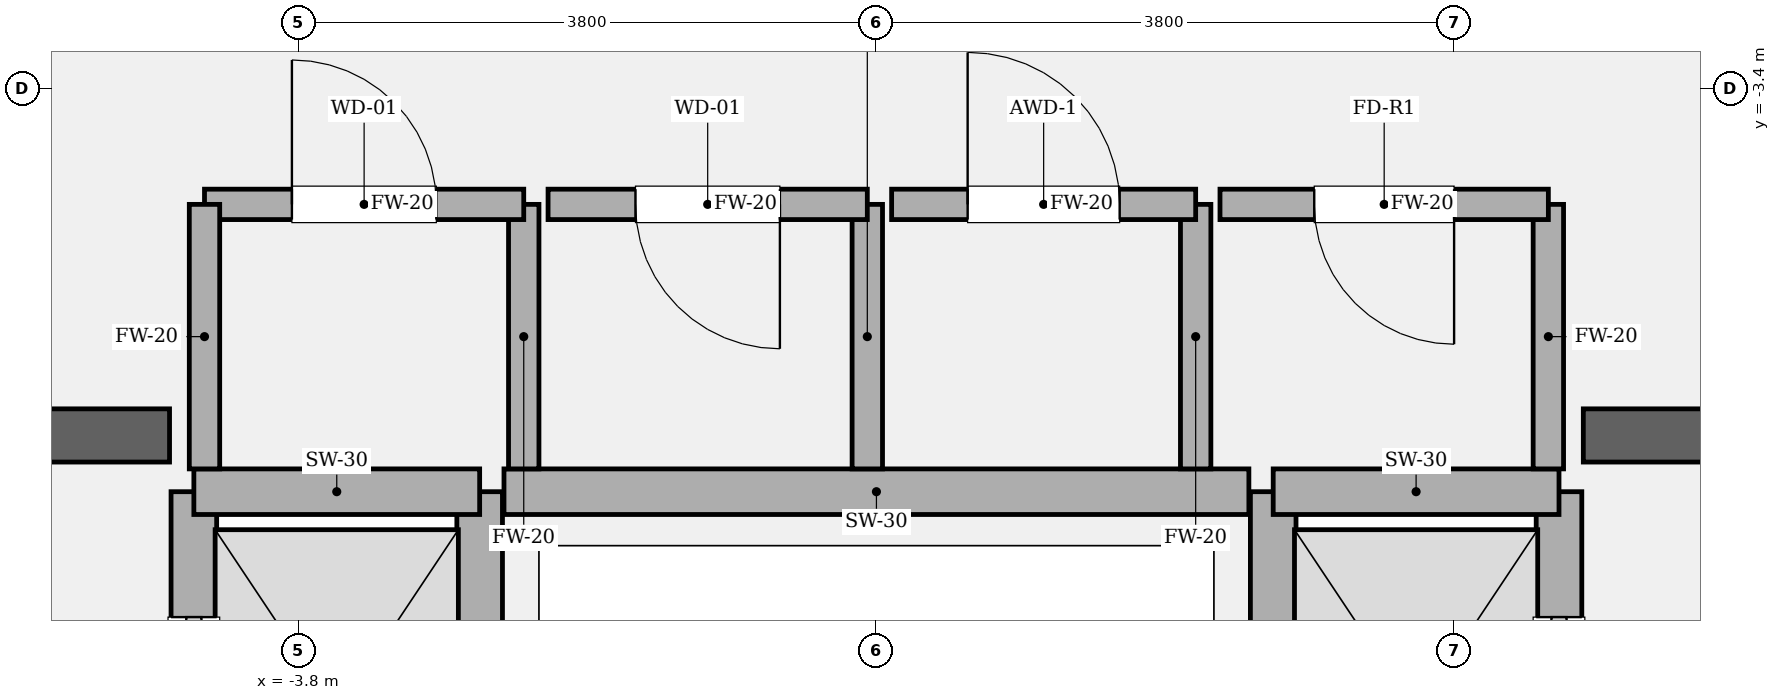
"""IFC4 building model, lengths in metres.
Left out: names, types, materials, properties, quantities, classifications, styles, units other than length and angle.
Written with IfcOpenShell. Run it as: python <this file> out.ifc"""

import sys

from ifc_helpers import new_model, si_unit, direction, frame, frame_2d, origin, place, context, subcontext, project, spatial, rectangle, extrude, element, fill, save


model = new_model("IFC4")
c1 = context("Model", 3, precision=1e-05, world=origin(), true_north=direction((0.0, 1.0)))
c2 = subcontext(c1, "Body", "Model", "MODEL_VIEW")
j1 = project(units=[si_unit("LENGTHUNIT", "METRE"), si_unit("PLANEANGLEUNIT", "RADIAN")], contexts=[c1])
p1 = place(None, origin())
s1 = spatial("IfcSite", under=j1, at=p1, CompositionType="ELEMENT")
p2 = place(p1, origin())
s2 = spatial("IfcBuilding", under=s1, at=p2, CompositionType="ELEMENT")
p3 = place(p2, frame((0.0, 0.0, 125.4)))
s3 = spatial("IfcBuildingStorey", under=s2, at=p3, CompositionType="ELEMENT", Elevation=125.4)
p4 = place(p3, frame((-9.875, -5.68, 0.0), z_axis=(0.0, 0.0, 1.0), x_axis=(1.0, 0.0, 0.0)))
e1 = element("IfcWall", 1, at=p4, inside=s3, PredefinedType="SOLIDWALL", context=c2, shape_type="SweptSolid", body=[
    extrude(rectangle(XDim=5.225, YDim=0.35, at=frame_2d((2.613, 0.0))), origin(), (0.0, 0.0, 1.0), 4.8),
])
p5 = place(p4, frame((1.335, 0.0, 0.0)))
e2 = element("IfcOpeningElement", 2, at=p5, cuts=e1, PredefinedType="OPENING", context=c2, shape_type="SweptSolid", body=[
    extrude(rectangle(XDim=1.18, YDim=2.2, at=frame_2d((0.59, 1.1))), frame((0.0, 0.185, 0.0), z_axis=(0.0, -1.0, 0.0), x_axis=(1.0, 0.0, 0.0)), (0.0, 0.0, 1.0), 0.37),
])
p6 = place(p3, frame((4.65, -5.68, 0.0), z_axis=(0.0, 0.0, 1.0), x_axis=(1.0, 0.0, 0.0)))
e3 = element("IfcWall", 3, at=p6, inside=s3, PredefinedType="SOLIDWALL", context=c2, shape_type="SweptSolid", body=[
    extrude(rectangle(XDim=5.225, YDim=0.35, at=frame_2d((2.613, 0.0))), origin(), (0.0, 0.0, 1.0), 4.8),
])
p7 = place(p6, frame((2.71, 0.0, 0.0)))
e4 = element("IfcOpeningElement", 4, at=p7, cuts=e3, PredefinedType="OPENING", context=c2, shape_type="SweptSolid", body=[
    extrude(rectangle(XDim=1.18, YDim=2.2, at=frame_2d((0.59, 1.1))), frame((0.0, 0.185, 0.0), z_axis=(0.0, -1.0, 0.0), x_axis=(1.0, 0.0, 0.0)), (0.0, 0.0, 1.0), 0.37),
])
p8 = place(p3, frame((-4.49, -8.82, 0.0), z_axis=(0.0, 0.0, 1.0), x_axis=(0.0, 1.0, 0.0)))
e5 = element("IfcWall", 5, at=p8, inside=s3, PredefinedType="SOLIDWALL", context=c2, shape_type="SweptSolid", body=[
    extrude(rectangle(XDim=2.77, YDim=0.3, at=frame_2d((1.385, 0.0))), origin(), (0.0, 0.0, 1.0), 4.48),
])
p9 = place(p8, frame((0.825, 0.0, 0.0)))
e6 = element("IfcOpeningElement", 6, at=p9, cuts=e5, PredefinedType="OPENING", context=c2, shape_type="SweptSolid", body=[
    extrude(rectangle(XDim=1.12, YDim=2.25, at=frame_2d((0.56, 1.125))), frame((0.0, 0.16, 0.0), z_axis=(0.0, -1.0, 0.0), x_axis=(1.0, 0.0, 0.0)), (0.0, 0.0, 1.0), 0.32),
])
p10 = place(p3, frame((-2.61, -8.82, 0.0), z_axis=(0.0, 0.0, 1.0), x_axis=(0.0, 1.0, 0.0)))
e7 = element("IfcWall", 7, at=p10, inside=s3, PredefinedType="SOLIDWALL", context=c2, shape_type="SweptSolid", body=[
    extrude(rectangle(XDim=2.77, YDim=0.3, at=frame_2d((1.385, 0.0))), origin(), (0.0, 0.0, 1.0), 4.48),
])
p11 = place(p3, frame((-4.49, -6.05, 0.0), z_axis=(0.0, 0.0, 1.0), x_axis=(1.0, 0.0, 0.0)))
e8 = element("IfcWall", 8, at=p11, inside=s3, PredefinedType="SOLIDWALL", context=c2, shape_type="SweptSolid", body=[
    extrude(rectangle(XDim=1.88, YDim=0.3, at=frame_2d((0.94, 0.0))), origin(), (0.0, 0.0, 1.0), 4.48),
])
p12 = place(p3, frame((4.49, -8.82, 0.0), z_axis=(0.0, 0.0, 1.0), x_axis=(0.0, 1.0, 0.0)))
e9 = element("IfcWall", 9, at=p12, inside=s3, PredefinedType="SOLIDWALL", context=c2, shape_type="SweptSolid", body=[
    extrude(rectangle(XDim=2.77, YDim=0.3, at=frame_2d((1.385, 0.0))), origin(), (0.0, 0.0, 1.0), 4.48),
])
p13 = place(p12, frame((0.825, 0.0, 0.0)))
e10 = element("IfcOpeningElement", 10, at=p13, cuts=e9, PredefinedType="OPENING", context=c2, shape_type="SweptSolid", body=[
    extrude(rectangle(XDim=1.12, YDim=2.25, at=frame_2d((0.56, 1.125))), frame((0.0, 0.16, 0.0), z_axis=(0.0, -1.0, 0.0), x_axis=(1.0, 0.0, 0.0)), (0.0, 0.0, 1.0), 0.32),
])
p14 = place(p3, frame((2.61, -8.82, 0.0), z_axis=(0.0, 0.0, 1.0), x_axis=(0.0, 1.0, 0.0)))
e11 = element("IfcWall", 11, at=p14, inside=s3, PredefinedType="SOLIDWALL", context=c2, shape_type="SweptSolid", body=[
    extrude(rectangle(XDim=2.77, YDim=0.3, at=frame_2d((1.385, 0.0))), origin(), (0.0, 0.0, 1.0), 4.48),
])
p15 = place(p3, frame((2.61, -6.05, 0.0), z_axis=(0.0, 0.0, 1.0), x_axis=(1.0, 0.0, 0.0)))
e12 = element("IfcWall", 12, at=p15, inside=s3, PredefinedType="SOLIDWALL", context=c2, shape_type="SweptSolid", body=[
    extrude(rectangle(XDim=1.88, YDim=0.3, at=frame_2d((0.94, 0.0))), origin(), (0.0, 0.0, 1.0), 4.48),
])
p16 = place(p3, frame((-2.45, -6.05, 0.0), z_axis=(0.0, 0.0, 1.0), x_axis=(1.0, 0.0, 0.0)))
e13 = element("IfcWall", 13, at=p16, inside=s3, PredefinedType="SOLIDWALL", context=c2, shape_type="SweptSolid", body=[
    extrude(rectangle(XDim=4.9, YDim=0.3, at=frame_2d((2.45, 0.0))), origin(), (0.0, 0.0, 1.0), 4.48),
])
p17 = place(p3, frame((-2.32, -5.9, 0.0), z_axis=(0.0, 0.0, 1.0), x_axis=(0.0, 1.0, 0.0)))
e14 = element("IfcWall", 14, at=p17, inside=s3, PredefinedType="SOLIDWALL", context=c2, shape_type="SweptSolid", body=[
    extrude(rectangle(XDim=1.74, YDim=0.2, at=frame_2d((0.87, 0.0))), origin(), (0.0, 0.0, 1.0), 4.48),
])
p18 = place(p3, frame((-2.32, -4.16, 0.0), z_axis=(0.0, 0.0, 1.0), x_axis=(-1.0, 0.0, 0.0)))
e15 = element("IfcWall", 15, at=p18, inside=s3, PredefinedType="SOLIDWALL", context=c2, shape_type="SweptSolid", body=[
    extrude(rectangle(XDim=2.1, YDim=0.2, at=frame_2d((1.05, 0.0))), origin(), (0.0, 0.0, 1.0), 4.48),
])
p19 = place(p18, frame((0.575, 0.0, 0.0)))
e16 = element("IfcOpeningElement", 16, at=p19, cuts=e15, PredefinedType="OPENING", context=c2, shape_type="SweptSolid", body=[
    extrude(rectangle(XDim=0.95, YDim=2.15, at=frame_2d((0.475, 1.075))), frame((0.0, 0.11, 0.0), z_axis=(0.0, -1.0, 0.0), x_axis=(1.0, 0.0, 0.0)), (0.0, 0.0, 1.0), 0.22),
])
for number, where, z_axis, x_axis in (
    (17, (-4.42, -4.16, 0.0), (0.0, 0.0, 1.0), (0.0, -1.0, 0.0)),
    (18, (-0.06, -5.9, 0.0), (0.0, 0.0, 1.0), (0.0, 1.0, 0.0)),
):
    element("IfcWall", number, at=place(p3, frame(where, z_axis=z_axis, x_axis=x_axis)), inside=s3, PredefinedType="SOLIDWALL", context=c2, shape_type="SweptSolid", body=[
        extrude(rectangle(XDim=1.74, YDim=0.2, at=frame_2d((0.87, 0.0))), origin(), (0.0, 0.0, 1.0), 4.48),
    ])
p20 = place(p3, frame((-0.06, -4.16, 0.0), z_axis=(0.0, 0.0, 1.0), x_axis=(-1.0, 0.0, 0.0)))
e19 = element("IfcWall", 19, at=p20, inside=s3, PredefinedType="SOLIDWALL", context=c2, shape_type="SweptSolid", body=[
    extrude(rectangle(XDim=2.1, YDim=0.2, at=frame_2d((1.05, 0.0))), origin(), (0.0, 0.0, 1.0), 4.48),
])
p21 = place(p20, frame((0.575, 0.0, 0.0)))
e20 = element("IfcOpeningElement", 20, at=p21, cuts=e19, PredefinedType="OPENING", context=c2, shape_type="SweptSolid", body=[
    extrude(rectangle(XDim=0.95, YDim=2.15, at=frame_2d((0.475, 1.075))), frame((0.0, 0.11, 0.0), z_axis=(0.0, -1.0, 0.0), x_axis=(1.0, 0.0, 0.0)), (0.0, 0.0, 1.0), 0.22),
])
p22 = place(p3, frame((2.1, -5.9, 0.0), z_axis=(0.0, 0.0, 1.0), x_axis=(0.0, 1.0, 0.0)))
e21 = element("IfcWall", 21, at=p22, inside=s3, PredefinedType="SOLIDWALL", context=c2, shape_type="SweptSolid", body=[
    extrude(rectangle(XDim=1.74, YDim=0.2, at=frame_2d((0.87, 0.0))), origin(), (0.0, 0.0, 1.0), 4.48),
])
p23 = place(p3, frame((2.1, -4.16, 0.0), z_axis=(0.0, 0.0, 1.0), x_axis=(-1.0, 0.0, 0.0)))
e22 = element("IfcWall", 22, at=p23, inside=s3, PredefinedType="SOLIDWALL", context=c2, shape_type="SweptSolid", body=[
    extrude(rectangle(XDim=2.0, YDim=0.2, at=frame_2d((1.0, 0.0))), origin(), (0.0, 0.0, 1.0), 4.48),
])
p24 = place(p23, frame((0.5, 0.0, 0.0)))
e23 = element("IfcOpeningElement", 23, at=p24, cuts=e22, PredefinedType="OPENING", context=c2, shape_type="SweptSolid", body=[
    extrude(rectangle(XDim=1.0, YDim=2.15, at=frame_2d((0.5, 1.075))), frame((0.0, 0.11, 0.0), z_axis=(0.0, -1.0, 0.0), x_axis=(1.0, 0.0, 0.0)), (0.0, 0.0, 1.0), 0.22),
])
p25 = place(p3, frame((4.42, -5.9, 0.0), z_axis=(0.0, 0.0, 1.0), x_axis=(0.0, 1.0, 0.0)))
e24 = element("IfcWall", 24, at=p25, inside=s3, PredefinedType="SOLIDWALL", context=c2, shape_type="SweptSolid", body=[
    extrude(rectangle(XDim=1.74, YDim=0.2, at=frame_2d((0.87, 0.0))), origin(), (0.0, 0.0, 1.0), 4.48),
])
p26 = place(p3, frame((4.42, -4.16, 0.0), z_axis=(0.0, 0.0, 1.0), x_axis=(-1.0, 0.0, 0.0)))
e25 = element("IfcWall", 25, at=p26, inside=s3, PredefinedType="SOLIDWALL", context=c2, shape_type="SweptSolid", body=[
    extrude(rectangle(XDim=2.16, YDim=0.2, at=frame_2d((1.08, 0.0))), origin(), (0.0, 0.0, 1.0), 4.48),
])
p27 = place(p26, frame((0.62, 0.0, 0.0)))
e26 = element("IfcOpeningElement", 26, at=p27, cuts=e25, PredefinedType="OPENING", context=c2, shape_type="SweptSolid", body=[
    extrude(rectangle(XDim=0.92, YDim=2.1, at=frame_2d((0.46, 1.05))), frame((0.0, 0.11, 0.0), z_axis=(0.0, -1.0, 0.0), x_axis=(1.0, 0.0, 0.0)), (0.0, 0.0, 1.0), 0.22),
])
p28 = place(p9, origin())
e27 = element("IfcDoor", 27, at=p28, inside=s3, OperationType="SLIDING_TO_LEFT", PredefinedType="DOOR", context=c2, shape_type="SweptSolid", body=[
    extrude(rectangle(XDim=1.12, YDim=2.25, at=frame_2d((0.56, 1.125))), frame((0.0, 0.025, 0.0), z_axis=(0.0, -1.0, 0.0), x_axis=(1.0, 0.0, 0.0)), (0.0, 0.0, 1.0), 0.05),
])
fill(e6, e27)
p29 = place(p13, origin())
e28 = element("IfcDoor", 28, at=p29, inside=s3, OperationType="SLIDING_TO_RIGHT", PredefinedType="DOOR", context=c2, shape_type="SweptSolid", body=[
    extrude(rectangle(XDim=1.12, YDim=2.25, at=frame_2d((0.56, 1.125))), frame((0.0, 0.025, 0.0), z_axis=(0.0, -1.0, 0.0), x_axis=(1.0, 0.0, 0.0)), (0.0, 0.0, 1.0), 0.05),
])
fill(e10, e28)
p30 = place(p19, origin())
e29 = element("IfcDoor", 29, at=p30, inside=s3, OperationType="SINGLE_SWING_RIGHT", PredefinedType="DOOR", context=c2, shape_type="SweptSolid", body=[
    extrude(rectangle(XDim=0.95, YDim=2.15, at=frame_2d((0.475, 1.075))), frame((0.0, 0.025, 0.0), z_axis=(0.0, -1.0, 0.0), x_axis=(1.0, 0.0, 0.0)), (0.0, 0.0, 1.0), 0.05),
])
fill(e16, e29)
p31 = place(p21, origin())
e30 = element("IfcDoor", 30, at=p31, inside=s3, OperationType="SINGLE_SWING_LEFT", PredefinedType="DOOR", context=c2, shape_type="SweptSolid", body=[
    extrude(rectangle(XDim=0.95, YDim=2.15, at=frame_2d((0.475, 1.075))), frame((0.0, 0.025, 0.0), z_axis=(0.0, -1.0, 0.0), x_axis=(1.0, 0.0, 0.0)), (0.0, 0.0, 1.0), 0.05),
])
fill(e20, e30)
p32 = place(p24, origin())
e31 = element("IfcDoor", 31, at=p32, inside=s3, OperationType="SINGLE_SWING_RIGHT", PredefinedType="DOOR", context=c2, shape_type="SweptSolid", body=[
    extrude(rectangle(XDim=1.0, YDim=2.15, at=frame_2d((0.5, 1.075))), frame((0.0, 0.025, 0.0), z_axis=(0.0, -1.0, 0.0), x_axis=(1.0, 0.0, 0.0)), (0.0, 0.0, 1.0), 0.05),
])
fill(e23, e31)
p33 = place(p27, origin())
e32 = element("IfcDoor", 32, at=p33, inside=s3, OperationType="SINGLE_SWING_LEFT", PredefinedType="DOOR", context=c2, shape_type="SweptSolid", body=[
    extrude(rectangle(XDim=0.92, YDim=2.1, at=frame_2d((0.46, 1.05))), frame((0.0, 0.025, 0.0), z_axis=(0.0, -1.0, 0.0), x_axis=(1.0, 0.0, 0.0)), (0.0, 0.0, 1.0), 0.05),
])
fill(e26, e32)
save(model, sys.argv[1])
